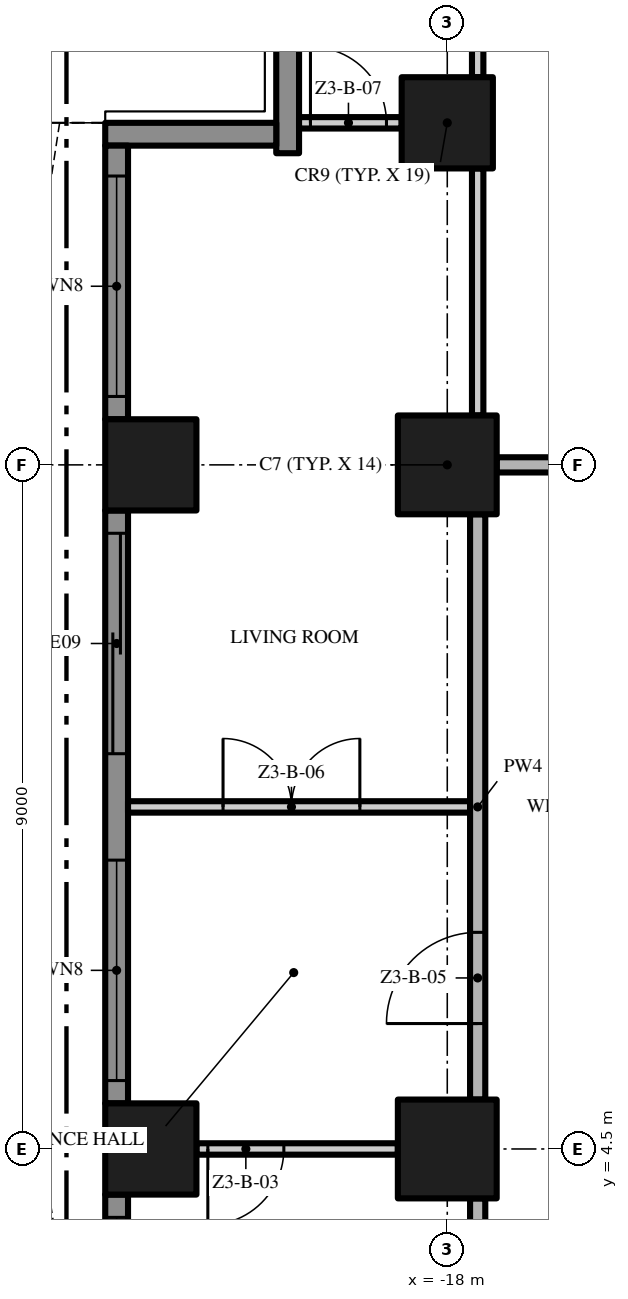
"""IFC4 building model, lengths in metres.
Left out: names, types, materials, properties, quantities, classifications, styles, units other than length and angle.
Written with IfcOpenShell. Run it as: python <this file> out.ifc"""

import sys

from ifc_helpers import new_model, si_unit, direction, frame, frame_2d, origin, origin_2d, place, context, subcontext, project, spatial, polyline, rectangle, outline, extrude, element, fill, save


model = new_model("IFC4")
c1 = context("Model", 3, precision=1e-05, world=origin(), true_north=direction((0.0, 1.0)))
c2 = subcontext(c1, "Body", "Model", "MODEL_VIEW")
j1 = project(units=[si_unit("LENGTHUNIT", "METRE"), si_unit("PLANEANGLEUNIT", "RADIAN")], contexts=[c1])
p1 = place(None, origin())
s1 = spatial("IfcSite", under=j1, at=p1, CompositionType="ELEMENT")
p2 = place(p1, origin())
s2 = spatial("IfcBuilding", under=s1, at=p2, CompositionType="ELEMENT")
p3 = place(p2, frame((0.0, 0.0, 136.4)))
s3 = spatial("IfcBuildingStorey", under=s2, at=p3, CompositionType="ELEMENT", Elevation=136.4)
for number, where, z_axis, x_axis in (
    (1, (-18.0, 13.5, 0.0), (0.0, 0.0, 1.0), (1.0, 0.0, 0.0)),
    (2, (-18.0, 4.5, 0.0), (0.0, 0.0, 1.0), (1.0, 0.0, 0.0)),
):
    element("IfcColumn", number, at=place(p3, frame(where, z_axis=z_axis, x_axis=x_axis)), inside=s3, PredefinedType="COLUMN", context=c2, shape_type="SweptSolid", body=[
        extrude(rectangle(XDim=1.3, YDim=1.3, at=origin_2d()), origin(), (0.0, 0.0, 1.0), 3.5),
    ])
for number, where, z_axis, x_axis in (
    (3, (-21.9, 13.5, 0.0), (0.0, 0.0, 1.0), (1.0, 0.0, 0.0)),
    (4, (-18.0, 18.0, 0.0), (0.0, 0.0, 1.0), (1.0, 0.0, 0.0)),
    (5, (-21.9, 4.5, 0.0), (0.0, 0.0, 1.0), (1.0, 0.0, 0.0)),
):
    element("IfcColumn", number, at=place(p3, frame(where, z_axis=z_axis, x_axis=x_axis)), inside=s3, PredefinedType="COLUMN", context=c2, shape_type="SweptSolid", body=[
        extrude(rectangle(XDim=1.2, YDim=1.2, at=origin_2d()), origin(), (0.0, 0.0, 1.0), 3.5),
    ])
p4 = place(p3, frame((-20.1, 17.6, 0.0), z_axis=(0.0, 0.0, 1.0), x_axis=(0.0, 1.0, 0.0)))
e6 = element("IfcWall", 6, at=p4, inside=s3, PredefinedType="SOLIDWALL", context=c2, shape_type="SweptSolid", body=[
    extrude(rectangle(XDim=2.35, YDim=0.3, at=frame_2d((1.175, 0.0))), origin(), (0.0, 0.0, 1.0), 3.5),
])
p5 = place(p3, frame((-22.5, 17.85, 0.0), z_axis=(0.0, 0.0, 1.0), x_axis=(1.0, 0.0, 0.0)))
e7 = element("IfcWall", 7, at=p5, inside=s3, PredefinedType="SOLIDWALL", context=c2, shape_type="SweptSolid", body=[
    extrude(rectangle(XDim=2.25, YDim=0.3, at=frame_2d((1.125, 0.0))), origin(), (0.0, 0.0, 1.0), 3.5),
])
p6 = place(p3, frame((-22.35, 14.1, 0.0), z_axis=(0.0, 0.0, 1.0), x_axis=(0.0, 1.0, 0.0)))
e8 = element("IfcWall", 8, at=p6, inside=s3, PredefinedType="SOLIDWALL", context=c2, shape_type="SweptSolid", body=[
    extrude(rectangle(XDim=3.6, YDim=0.3, at=frame_2d((1.8, 0.0))), origin(), (0.0, 0.0, 1.0), 3.5),
])
p7 = place(p6, frame((0.3, 0.0, 0.45)))
e9 = element("IfcOpeningElement", 9, at=p7, cuts=e8, PredefinedType="OPENING", context=c2, shape_type="SweptSolid", body=[
    extrude(rectangle(XDim=2.9, YDim=2.65, at=frame_2d((1.45, 1.325))), frame((0.0, 0.16, 0.0), z_axis=(0.0, -1.0, 0.0), x_axis=(1.0, 0.0, 0.0)), (0.0, 0.0, 1.0), 0.32),
])
p8 = place(p3, frame((-22.35, 5.1, 0.0), z_axis=(0.0, 0.0, 1.0), x_axis=(0.0, 1.0, 0.0)))
e10 = element("IfcWall", 10, at=p8, inside=s3, PredefinedType="SOLIDWALL", context=c2, shape_type="SweptSolid", body=[
    extrude(rectangle(XDim=7.8, YDim=0.3, at=frame_2d((3.9, 0.0))), origin(), (0.0, 0.0, 1.0), 3.5),
])
p9 = place(p8, frame((4.6, 0.0, 0.0)))
e11 = element("IfcOpeningElement", 11, at=p9, cuts=e10, PredefinedType="OPENING", context=c2, shape_type="SweptSolid", body=[
    extrude(rectangle(XDim=2.9, YDim=2.4, at=frame_2d((1.45, 1.2))), frame((0.0, 0.16, 0.0), z_axis=(0.0, -1.0, 0.0), x_axis=(1.0, 0.0, 0.0)), (0.0, 0.0, 1.0), 0.32),
])
p10 = place(p8, frame((0.3, 0.0, 0.45)))
e12 = element("IfcOpeningElement", 12, at=p10, cuts=e10, PredefinedType="OPENING", context=c2, shape_type="SweptSolid", body=[
    extrude(rectangle(XDim=2.9, YDim=2.65, at=frame_2d((1.45, 1.325))), frame((0.0, 0.16, 0.0), z_axis=(0.0, -1.0, 0.0), x_axis=(1.0, 0.0, 0.0)), (0.0, 0.0, 1.0), 0.32),
])
p11 = place(p3, frame((-22.35, -3.9, 0.0), z_axis=(0.0, 0.0, 1.0), x_axis=(0.0, 1.0, 0.0)))
e13 = element("IfcWall", 13, at=p11, inside=s3, PredefinedType="SOLIDWALL", context=c2, shape_type="SweptSolid", body=[
    extrude(rectangle(XDim=7.8, YDim=0.3, at=frame_2d((3.9, 0.0))), origin(), (0.0, 0.0, 1.0), 3.5),
])
p12 = place(p11, frame((4.6, 0.0, 0.45)))
e14 = element("IfcOpeningElement", 14, at=p12, cuts=e13, PredefinedType="OPENING", context=c2, shape_type="SweptSolid", body=[
    extrude(rectangle(XDim=2.9, YDim=2.65, at=frame_2d((1.45, 1.325))), frame((0.0, 0.16, 0.0), z_axis=(0.0, -1.0, 0.0), x_axis=(1.0, 0.0, 0.0)), (0.0, 0.0, 1.0), 0.32),
])
p13 = place(p11, frame((0.3, 0.0, 0.0)))
e15 = element("IfcOpeningElement", 15, at=p13, cuts=e13, PredefinedType="OPENING", context=c2, shape_type="SweptSolid", body=[
    extrude(rectangle(XDim=2.9, YDim=2.4, at=frame_2d((1.45, 1.2))), frame((0.0, 0.16, 0.0), z_axis=(0.0, -1.0, 0.0), x_axis=(1.0, 0.0, 0.0)), (0.0, 0.0, 1.0), 0.32),
])
p14 = place(p3, origin())
e16 = element("IfcWall", 16, at=p14, inside=s3, PredefinedType="USERDEFINED", context=c2, shape_type="SweptSolid", body=[
    extrude(outline(polyline([(-23.1, 18.0), (-23.329, 16.5), (-23.929, 15.0), (-24.671, 13.5), (-25.271, 12.0), (-25.5, 10.5), (-25.271, 9.0), (-24.671, 7.5), (-23.929, 6.0), (-23.329, 4.5), (-23.1, 3.0), (-23.329, 1.5), (-23.929, 0.0), (-24.671, -1.5), (-25.271, -3.0), (-25.5, -4.5), (-25.271, -6.0), (-24.671, -7.5), (-23.929, -9.0), (-23.329, -10.5), (-23.1, -12.0), (-23.329, -13.5), (-23.082, -13.538), (-22.847, -12.0), (-23.086, -10.434), (-23.701, -8.898), (-24.442, -7.398), (-25.028, -5.934), (-25.247, -4.5), (-25.028, -3.066), (-24.442, -1.602), (-23.701, -0.102), (-23.086, 1.434), (-22.847, 3.0), (-23.086, 4.566), (-23.701, 6.102), (-24.442, 7.602), (-25.028, 9.066), (-25.247, 10.5), (-25.028, 11.934), (-24.442, 13.398), (-23.701, 14.898), (-23.086, 16.434), (-22.853, 17.962), (-23.1, 18.0)])), origin(), (0.0, 0.0, 1.0), 0.9),
])
p15 = place(p3, frame((-18.65, 4.5, 0.0), z_axis=(0.0, 0.0, 1.0), x_axis=(-1.0, 0.0, 0.0)))
e17 = element("IfcWall", 17, at=p15, inside=s3, PredefinedType="PARTITIONING", context=c2, shape_type="SweptSolid", body=[
    extrude(rectangle(XDim=2.65, YDim=0.15, at=frame_2d((1.325, 0.0))), origin(), (0.0, 0.0, 1.0), 3.5),
])
p16 = place(p15, frame((1.5, 0.0, 0.0)))
e18 = element("IfcOpeningElement", 18, at=p16, cuts=e17, PredefinedType="OPENING", context=c2, shape_type="SweptSolid", body=[
    extrude(rectangle(XDim=1.0, YDim=2.4, at=frame_2d((0.5, 1.2))), frame((0.0, 0.085, 0.0), z_axis=(0.0, -1.0, 0.0), x_axis=(1.0, 0.0, 0.0)), (0.0, 0.0, 1.0), 0.17),
])
p17 = place(p3, frame((-22.2, 9.0, 0.0), z_axis=(0.0, 0.0, 1.0), x_axis=(1.0, 0.0, 0.0)))
e19 = element("IfcWall", 19, at=p17, inside=s3, PredefinedType="PARTITIONING", context=c2, shape_type="SweptSolid", body=[
    extrude(rectangle(XDim=4.5, YDim=0.15, at=frame_2d((2.25, 0.0))), origin(), (0.0, 0.0, 1.0), 3.5),
])
p18 = place(p17, frame((1.25, 0.0, 0.0)))
e20 = element("IfcOpeningElement", 20, at=p18, cuts=e19, PredefinedType="OPENING", context=c2, shape_type="SweptSolid", body=[
    extrude(rectangle(XDim=1.8, YDim=2.4, at=frame_2d((0.9, 1.2))), frame((0.0, 0.085, 0.0), z_axis=(0.0, -1.0, 0.0), x_axis=(1.0, 0.0, 0.0)), (0.0, 0.0, 1.0), 0.17),
])
p19 = place(p3, frame((-17.35, 13.5, 0.0), z_axis=(0.0, 0.0, 1.0), x_axis=(1.0, 0.0, 0.0)))
e21 = element("IfcWall", 21, at=p19, inside=s3, PredefinedType="PARTITIONING", context=c2, shape_type="SweptSolid", body=[
    extrude(rectangle(XDim=3.85, YDim=0.2, at=frame_2d((1.925, 0.0))), origin(), (0.0, 0.0, 1.0), 3.5),
])
p20 = place(p19, frame((1.35, 0.0, 0.0)))
e22 = element("IfcOpeningElement", 22, at=p20, cuts=e21, PredefinedType="OPENING", context=c2, shape_type="SweptSolid", body=[
    extrude(rectangle(XDim=0.9, YDim=2.1, at=frame_2d((0.45, 1.05))), frame((0.0, 0.11, 0.0), z_axis=(0.0, -1.0, 0.0), x_axis=(1.0, 0.0, 0.0)), (0.0, 0.0, 1.0), 0.22),
])
p21 = place(p3, frame((-19.95, 18.0, 0.0), z_axis=(0.0, 0.0, 1.0), x_axis=(1.0, 0.0, 0.0)))
e23 = element("IfcWall", 23, at=p21, inside=s3, PredefinedType="PARTITIONING", context=c2, shape_type="SweptSolid", body=[
    extrude(rectangle(XDim=1.35, YDim=0.15, at=frame_2d((0.675, 0.0))), origin(), (0.0, 0.0, 1.0), 3.5),
])
p22 = place(p21, frame((0.15, 0.0, 0.0)))
e24 = element("IfcOpeningElement", 24, at=p22, cuts=e23, PredefinedType="OPENING", context=c2, shape_type="SweptSolid", body=[
    extrude(rectangle(XDim=1.0, YDim=2.4, at=frame_2d((0.5, 1.2))), frame((0.0, 0.085, 0.0), z_axis=(0.0, -1.0, 0.0), x_axis=(1.0, 0.0, 0.0)), (0.0, 0.0, 1.0), 0.17),
])
p23 = place(p3, frame((-17.6, -0.2, 0.0), z_axis=(0.0, 0.0, 1.0), x_axis=(0.0, 1.0, 0.0)))
e25 = element("IfcWall", 25, at=p23, inside=s3, PredefinedType="PARTITIONING", context=c2, shape_type="SweptSolid", body=[
    extrude(rectangle(XDim=4.05, YDim=0.2, at=frame_2d((2.025, 0.0))), origin(), (0.0, 0.0, 1.0), 3.5),
])
p24 = place(p3, frame((-17.6, 5.15, 0.0), z_axis=(0.0, 0.0, 1.0), x_axis=(0.0, 1.0, 0.0)))
e26 = element("IfcWall", 26, at=p24, inside=s3, PredefinedType="PARTITIONING", context=c2, shape_type="SweptSolid", body=[
    extrude(rectangle(XDim=7.7, YDim=0.2, at=frame_2d((3.85, 0.0))), origin(), (0.0, 0.0, 1.0), 3.5),
])
p25 = place(p24, frame((1.0, 0.0, 0.0)))
e27 = element("IfcOpeningElement", 27, at=p25, cuts=e26, PredefinedType="OPENING", context=c2, shape_type="SweptSolid", body=[
    extrude(rectangle(XDim=1.2, YDim=2.4, at=frame_2d((0.6, 1.2))), frame((0.0, 0.11, 0.0), z_axis=(0.0, -1.0, 0.0), x_axis=(1.0, 0.0, 0.0)), (0.0, 0.0, 1.0), 0.22),
])
p26 = place(p3, frame((-17.6, 14.15, 0.0), z_axis=(0.0, 0.0, 1.0), x_axis=(0.0, 1.0, 0.0)))
e28 = element("IfcWall", 28, at=p26, inside=s3, PredefinedType="PARTITIONING", context=c2, shape_type="SweptSolid", body=[
    extrude(rectangle(XDim=3.25, YDim=0.15, at=frame_2d((1.625, 0.0))), origin(), (0.0, 0.0, 1.0), 3.5),
])
p27 = place(p3, frame((-17.6, 18.6, 0.0), z_axis=(0.0, 0.0, 1.0), x_axis=(0.0, 1.0, 0.0)))
e29 = element("IfcWall", 29, at=p27, inside=s3, PredefinedType="PARTITIONING", context=c2, shape_type="SweptSolid", body=[
    extrude(rectangle(XDim=2.7, YDim=0.15, at=frame_2d((1.35, 0.0))), origin(), (0.0, 0.0, 1.0), 3.5),
])
p28 = place(p7, origin())
e30 = element("IfcWindow", 30, at=p28, inside=s3, PartitioningType="SINGLE_PANEL", PredefinedType="WINDOW", context=c2, shape_type="SweptSolid", body=[
    extrude(rectangle(XDim=2.9, YDim=2.65, at=frame_2d((1.45, 1.325))), frame((0.0, 0.03, 0.0), z_axis=(0.0, -1.0, 0.0), x_axis=(1.0, 0.0, 0.0)), (0.0, 0.0, 1.0), 0.06),
])
fill(e9, e30)
p29 = place(p9, origin())
e31 = element("IfcDoor", 31, at=p29, inside=s3, OperationType="SINGLE_SWING_LEFT", PredefinedType="DOOR", context=c2, shape_type="SweptSolid", body=[
    extrude(rectangle(XDim=2.9, YDim=2.4, at=frame_2d((1.45, 1.2))), frame((0.0, 0.025, 0.0), z_axis=(0.0, -1.0, 0.0), x_axis=(1.0, 0.0, 0.0)), (0.0, 0.0, 1.0), 0.05),
])
fill(e11, e31)
p30 = place(p10, origin())
e32 = element("IfcWindow", 32, at=p30, inside=s3, PartitioningType="SINGLE_PANEL", PredefinedType="WINDOW", context=c2, shape_type="SweptSolid", body=[
    extrude(rectangle(XDim=2.9, YDim=2.65, at=frame_2d((1.45, 1.325))), frame((0.0, 0.03, 0.0), z_axis=(0.0, -1.0, 0.0), x_axis=(1.0, 0.0, 0.0)), (0.0, 0.0, 1.0), 0.06),
])
fill(e12, e32)
p31 = place(p12, origin())
e33 = element("IfcWindow", 33, at=p31, inside=s3, PartitioningType="SINGLE_PANEL", PredefinedType="WINDOW", context=c2, shape_type="SweptSolid", body=[
    extrude(rectangle(XDim=2.9, YDim=2.65, at=frame_2d((1.45, 1.325))), frame((0.0, 0.03, 0.0), z_axis=(0.0, -1.0, 0.0), x_axis=(1.0, 0.0, 0.0)), (0.0, 0.0, 1.0), 0.06),
])
fill(e14, e33)
p32 = place(p16, origin())
e34 = element("IfcDoor", 34, at=p32, inside=s3, OperationType="SINGLE_SWING_RIGHT", PredefinedType="DOOR", context=c2, shape_type="SweptSolid", body=[
    extrude(rectangle(XDim=1.0, YDim=2.4, at=frame_2d((0.5, 1.2))), frame((0.0, 0.025, 0.0), z_axis=(0.0, -1.0, 0.0), x_axis=(1.0, 0.0, 0.0)), (0.0, 0.0, 1.0), 0.05),
])
fill(e18, e34)
p33 = place(p25, origin())
e35 = element("IfcDoor", 35, at=p33, inside=s3, OperationType="SINGLE_SWING_LEFT", PredefinedType="DOOR", context=c2, shape_type="SweptSolid", body=[
    extrude(rectangle(XDim=1.2, YDim=2.4, at=frame_2d((0.6, 1.2))), frame((0.0, 0.025, 0.0), z_axis=(0.0, -1.0, 0.0), x_axis=(1.0, 0.0, 0.0)), (0.0, 0.0, 1.0), 0.05),
])
fill(e27, e35)
p34 = place(p18, origin())
e36 = element("IfcDoor", 36, at=p34, inside=s3, OperationType="DOUBLE_DOOR_SINGLE_SWING", PredefinedType="DOOR", context=c2, shape_type="SweptSolid", body=[
    extrude(rectangle(XDim=1.8, YDim=2.4, at=frame_2d((0.9, 1.2))), frame((0.0, 0.025, 0.0), z_axis=(0.0, -1.0, 0.0), x_axis=(1.0, 0.0, 0.0)), (0.0, 0.0, 1.0), 0.05),
])
fill(e20, e36)
p35 = place(p22, origin())
e37 = element("IfcDoor", 37, at=p35, inside=s3, OperationType="SINGLE_SWING_LEFT", PredefinedType="DOOR", context=c2, shape_type="SweptSolid", body=[
    extrude(rectangle(XDim=1.0, YDim=2.4, at=frame_2d((0.5, 1.2))), frame((0.0, 0.025, 0.0), z_axis=(0.0, -1.0, 0.0), x_axis=(1.0, 0.0, 0.0)), (0.0, 0.0, 1.0), 0.05),
])
fill(e24, e37)
save(model, sys.argv[1])
